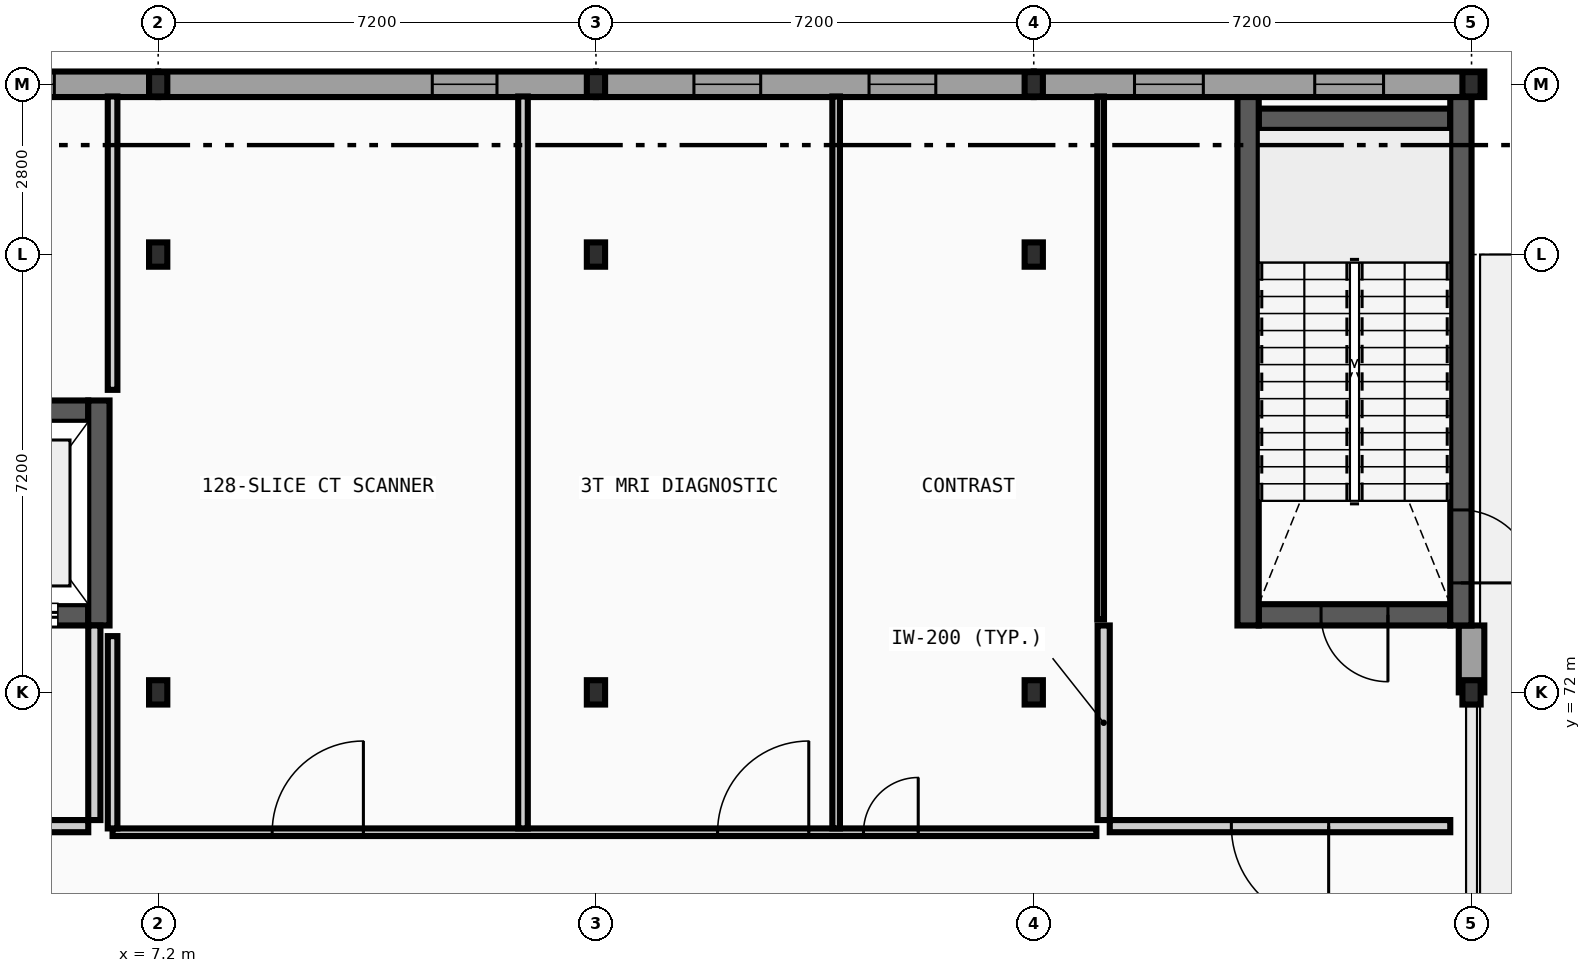
"""IFC4 building model, lengths in metres.
Left out: names, types, materials, properties, quantities, classifications, styles, units other than length and angle.
Written with IfcOpenShell. Run it as: python <this file> out.ifc"""

import sys

from ifc_helpers import new_model, si_unit, direction, frame, frame_2d, origin, origin_2d, place, context, subcontext, project, spatial, rectangle, i_section, extrude, element, fill, save


model = new_model("IFC4")
c1 = context("Model", 3, precision=1e-05, world=origin(), true_north=direction((0.0, 1.0)))
c2 = subcontext(c1, "Body", "Model", "MODEL_VIEW")
j1 = project(units=[si_unit("LENGTHUNIT", "METRE"), si_unit("PLANEANGLEUNIT", "RADIAN")], contexts=[c1])
p1 = place(None, origin())
s1 = spatial("IfcSite", under=j1, at=p1, CompositionType="ELEMENT")
p2 = place(p1, origin())
s2 = spatial("IfcBuilding", under=s1, at=p2, CompositionType="ELEMENT")
p3 = place(p2, origin())
s3 = spatial("IfcBuildingStorey", under=s2, at=p3, CompositionType="ELEMENT", Elevation=0.0)
for number, where, z_axis, x_axis in (
    (1, (7.2, 72.0, 0.0), (0.0, 0.0, 1.0), (1.0, 0.0, 0.0)),
    (2, (7.2, 79.2, 0.0), (0.0, 0.0, 1.0), (1.0, 0.0, 0.0)),
    (3, (7.2, 82.0, 0.0), (0.0, 0.0, 1.0), (1.0, 0.0, 0.0)),
    (4, (14.4, 72.0, 0.0), (0.0, 0.0, 1.0), (1.0, 0.0, 0.0)),
    (5, (14.4, 79.2, 0.0), (0.0, 0.0, 1.0), (1.0, 0.0, 0.0)),
    (6, (14.4, 82.0, 0.0), (0.0, 0.0, 1.0), (1.0, 0.0, 0.0)),
    (7, (21.6, 72.0, 0.0), (0.0, 0.0, 1.0), (1.0, 0.0, 0.0)),
    (8, (21.6, 79.2, 0.0), (0.0, 0.0, 1.0), (1.0, 0.0, 0.0)),
    (9, (21.6, 82.0, 0.0), (0.0, 0.0, 1.0), (1.0, 0.0, 0.0)),
    (10, (28.8, 72.0, 0.0), (0.0, 0.0, 1.0), (1.0, 0.0, 0.0)),
    (11, (28.8, 82.0, 0.0), (0.0, 0.0, 1.0), (1.0, 0.0, 0.0)),
):
    element("IfcColumn", number, at=place(p3, frame(where, z_axis=z_axis, x_axis=x_axis)), inside=s3, PredefinedType="COLUMN", context=c2, shape_type="SweptSolid", body=[
        extrude(i_section(OverallWidth=0.3, OverallDepth=0.4, WebThickness=0.013, FlangeThickness=0.024, FilletRadius=0.027, at=origin_2d()), origin(), (0.0, 0.0, 1.0), 5.2),
    ])
p4 = place(p3, frame((7.2, 82.0, 0.0), z_axis=(0.0, 0.0, 1.0), x_axis=(-1.0, 0.0, 0.0)))
e12 = element("IfcWall", 12, at=p4, inside=s3, PredefinedType="STANDARD", context=c2, shape_type="SweptSolid", body=[
    extrude(rectangle(XDim=7.41, YDim=0.42, at=frame_2d((3.705, 0.0))), origin(), (0.0, 0.0, 1.0), 4.635),
])
p5 = place(p4, frame((1.708, 0.0, 0.95)))
e13 = element("IfcOpeningElement", 13, at=p5, cuts=e12, PredefinedType="OPENING", context=c2, shape_type="SweptSolid", body=[
    extrude(rectangle(XDim=1.03, YDim=1.404, at=frame_2d((0.515, 0.702))), frame((0.0, 0.22, 0.0), z_axis=(0.0, -1.0, 0.0), x_axis=(1.0, 0.0, 0.0)), (0.0, 0.0, 1.0), 0.44),
])
p6 = place(p4, frame((4.672, 0.0, 0.95)))
e14 = element("IfcOpeningElement", 14, at=p6, cuts=e12, PredefinedType="OPENING", context=c2, shape_type="SweptSolid", body=[
    extrude(rectangle(XDim=1.03, YDim=1.404, at=frame_2d((0.515, 0.702))), frame((0.0, 0.22, 0.0), z_axis=(0.0, -1.0, 0.0), x_axis=(1.0, 0.0, 0.0)), (0.0, 0.0, 1.0), 0.44),
])
p7 = place(p3, frame((14.4, 82.0, 0.0), z_axis=(0.0, 0.0, 1.0), x_axis=(-1.0, 0.0, 0.0)))
e15 = element("IfcWall", 15, at=p7, inside=s3, PredefinedType="STANDARD", context=c2, shape_type="SweptSolid", body=[
    extrude(rectangle(XDim=7.2, YDim=0.42, at=frame_2d((3.6, 0.0))), origin(), (0.0, 0.0, 1.0), 4.635),
])
p8 = place(p7, frame((1.628, 0.0, 0.95)))
e16 = element("IfcOpeningElement", 16, at=p8, cuts=e15, PredefinedType="OPENING", context=c2, shape_type="SweptSolid", body=[
    extrude(rectangle(XDim=1.064, YDim=1.404, at=frame_2d((0.532, 0.702))), frame((0.0, 0.22, 0.0), z_axis=(0.0, -1.0, 0.0), x_axis=(1.0, 0.0, 0.0)), (0.0, 0.0, 1.0), 0.44),
])
p9 = place(p3, frame((21.6, 82.0, 0.0), z_axis=(0.0, 0.0, 1.0), x_axis=(-1.0, 0.0, 0.0)))
e17 = element("IfcWall", 17, at=p9, inside=s3, PredefinedType="STANDARD", context=c2, shape_type="SweptSolid", body=[
    extrude(rectangle(XDim=7.2, YDim=0.42, at=frame_2d((3.6, 0.0))), origin(), (0.0, 0.0, 1.0), 4.635),
])
p10 = place(p9, frame((1.611, 0.0, 0.95)))
e18 = element("IfcOpeningElement", 18, at=p10, cuts=e17, PredefinedType="OPENING", context=c2, shape_type="SweptSolid", body=[
    extrude(rectangle(XDim=1.098, YDim=1.404, at=frame_2d((0.549, 0.702))), frame((0.0, 0.22, 0.0), z_axis=(0.0, -1.0, 0.0), x_axis=(1.0, 0.0, 0.0)), (0.0, 0.0, 1.0), 0.44),
])
p11 = place(p9, frame((4.491, 0.0, 0.95)))
e19 = element("IfcOpeningElement", 19, at=p11, cuts=e17, PredefinedType="OPENING", context=c2, shape_type="SweptSolid", body=[
    extrude(rectangle(XDim=1.098, YDim=1.404, at=frame_2d((0.549, 0.702))), frame((0.0, 0.22, 0.0), z_axis=(0.0, -1.0, 0.0), x_axis=(1.0, 0.0, 0.0)), (0.0, 0.0, 1.0), 0.44),
])
p12 = place(p3, frame((29.01, 82.0, 0.0), z_axis=(0.0, 0.0, 1.0), x_axis=(-1.0, 0.0, 0.0)))
e20 = element("IfcWall", 20, at=p12, inside=s3, PredefinedType="STANDARD", context=c2, shape_type="SweptSolid", body=[
    extrude(rectangle(XDim=7.41, YDim=0.42, at=frame_2d((3.705, 0.0))), origin(), (0.0, 0.0, 1.0), 4.635),
])
p13 = place(p12, frame((1.657, 0.0, 0.95)))
e21 = element("IfcOpeningElement", 21, at=p13, cuts=e20, PredefinedType="OPENING", context=c2, shape_type="SweptSolid", body=[
    extrude(rectangle(XDim=1.132, YDim=1.404, at=frame_2d((0.566, 0.702))), frame((0.0, 0.22, 0.0), z_axis=(0.0, -1.0, 0.0), x_axis=(1.0, 0.0, 0.0)), (0.0, 0.0, 1.0), 0.44),
])
p14 = place(p12, frame((4.621, 0.0, 0.95)))
e22 = element("IfcOpeningElement", 22, at=p14, cuts=e20, PredefinedType="OPENING", context=c2, shape_type="SweptSolid", body=[
    extrude(rectangle(XDim=1.132, YDim=1.404, at=frame_2d((0.566, 0.702))), frame((0.0, 0.22, 0.0), z_axis=(0.0, -1.0, 0.0), x_axis=(1.0, 0.0, 0.0)), (0.0, 0.0, 1.0), 0.44),
])
p15 = place(p3, frame((28.8, 72.0, 0.0), z_axis=(0.0, 0.0, 1.0), x_axis=(0.0, 1.0, 0.0)))
e23 = element("IfcWall", 23, at=p15, inside=s3, PredefinedType="STANDARD", context=c2, shape_type="SweptSolid", body=[
    extrude(rectangle(XDim=1.1, YDim=0.42, at=frame_2d((0.55, 0.0))), origin(), (0.0, 0.0, 1.0), 4.94),
])
p16 = place(p3, frame((3.85, 73.275, 0.0), z_axis=(0.0, 0.0, 1.0), x_axis=(1.0, 0.0, 0.0)))
e24 = element("IfcWall", 24, at=p16, inside=s3, PredefinedType="SHEAR", context=c2, shape_type="SweptSolid", body=[
    extrude(rectangle(XDim=2.2, YDim=0.35, at=frame_2d((1.1, 0.0))), origin(), (0.0, 0.0, 1.0), 4.94),
])
p17 = place(p16, frame((0.5, 0.0, 0.0)))
e25 = element("IfcOpeningElement", 25, at=p17, cuts=e24, PredefinedType="OPENING", context=c2, shape_type="SweptSolid", body=[
    extrude(rectangle(XDim=1.2, YDim=2.2, at=frame_2d((0.6, 1.1))), frame((0.0, 0.185, 0.0), z_axis=(0.0, -1.0, 0.0), x_axis=(1.0, 0.0, 0.0)), (0.0, 0.0, 1.0), 0.37),
])
p18 = place(p3, frame((3.85, 76.625, 0.0), z_axis=(0.0, 0.0, 1.0), x_axis=(1.0, 0.0, 0.0)))
e26 = element("IfcWall", 26, at=p18, inside=s3, PredefinedType="SHEAR", context=c2, shape_type="SweptSolid", body=[
    extrude(rectangle(XDim=2.2, YDim=0.35, at=frame_2d((1.1, 0.0))), origin(), (0.0, 0.0, 1.0), 4.94),
])
p19 = place(p3, frame((6.225, 73.1, 0.0), z_axis=(0.0, 0.0, 1.0), x_axis=(0.0, 1.0, 0.0)))
e27 = element("IfcWall", 27, at=p19, inside=s3, PredefinedType="SHEAR", context=c2, shape_type="SweptSolid", body=[
    extrude(rectangle(XDim=3.7, YDim=0.35, at=frame_2d((1.85, 0.0))), origin(), (0.0, 0.0, 1.0), 4.94),
])
p20 = place(p3, frame((0.35, 69.8, 0.0), z_axis=(0.0, 0.0, 1.0), x_axis=(1.0, 0.0, 0.0)))
e28 = element("IfcWall", 28, at=p20, inside=s3, PredefinedType="PARTITIONING", context=c2, shape_type="SweptSolid", body=[
    extrude(rectangle(XDim=5.7, YDim=0.2, at=frame_2d((2.85, 0.0))), origin(), (0.0, 0.0, 1.0), 4.94),
])
p21 = place(p20, frame((2.05, 0.0, 0.0)))
e29 = element("IfcOpeningElement", 29, at=p21, cuts=e28, PredefinedType="OPENING", context=c2, shape_type="SweptSolid", body=[
    extrude(rectangle(XDim=1.6, YDim=2.2, at=frame_2d((0.8, 1.1))), frame((0.0, 0.11, 0.0), z_axis=(0.0, -1.0, 0.0), x_axis=(1.0, 0.0, 0.0)), (0.0, 0.0, 1.0), 0.22),
])
p22 = place(p3, frame((6.15, 69.9, 0.0), z_axis=(0.0, 0.0, 1.0), x_axis=(0.0, 1.0, 0.0)))
e30 = element("IfcWall", 30, at=p22, inside=s3, PredefinedType="PARTITIONING", context=c2, shape_type="SweptSolid", body=[
    extrude(rectangle(XDim=3.2, YDim=0.2, at=frame_2d((1.6, 0.0))), origin(), (0.0, 0.0, 1.0), 4.94),
])
p23 = place(p3, frame((25.3, 73.275, 0.0), z_axis=(0.0, 0.0, 1.0), x_axis=(1.0, 0.0, 0.0)))
e31 = element("IfcWall", 31, at=p23, inside=s3, PredefinedType="SHEAR", context=c2, shape_type="SweptSolid", body=[
    extrude(rectangle(XDim=3.15, YDim=0.35, at=frame_2d((1.575, 0.0))), origin(), (0.0, 0.0, 1.0), 4.94),
])
p24 = place(p23, frame((1.025, 0.0, 0.0)))
e32 = element("IfcOpeningElement", 32, at=p24, cuts=e31, PredefinedType="OPENING", context=c2, shape_type="SweptSolid", body=[
    extrude(rectangle(XDim=1.1, YDim=2.15, at=frame_2d((0.55, 1.075))), frame((0.0, 0.185, 0.0), z_axis=(0.0, -1.0, 0.0), x_axis=(1.0, 0.0, 0.0)), (0.0, 0.0, 1.0), 0.37),
])
p25 = place(p3, frame((25.3, 81.425, 0.0), z_axis=(0.0, 0.0, 1.0), x_axis=(1.0, 0.0, 0.0)))
e33 = element("IfcWall", 33, at=p25, inside=s3, PredefinedType="SHEAR", context=c2, shape_type="SweptSolid", body=[
    extrude(rectangle(XDim=3.15, YDim=0.35, at=frame_2d((1.575, 0.0))), origin(), (0.0, 0.0, 1.0), 4.94),
])
p26 = place(p3, frame((25.125, 73.1, 0.0), z_axis=(0.0, 0.0, 1.0), x_axis=(0.0, 1.0, 0.0)))
e34 = element("IfcWall", 34, at=p26, inside=s3, PredefinedType="SHEAR", context=c2, shape_type="SweptSolid", body=[
    extrude(rectangle(XDim=8.69, YDim=0.35, at=frame_2d((4.345, 0.0))), origin(), (0.0, 0.0, 1.0), 4.94),
])
p27 = place(p3, frame((28.625, 73.1, 0.0), z_axis=(0.0, 0.0, 1.0), x_axis=(0.0, 1.0, 0.0)))
e35 = element("IfcWall", 35, at=p27, inside=s3, PredefinedType="SHEAR", context=c2, shape_type="SweptSolid", body=[
    extrude(rectangle(XDim=8.69, YDim=0.35, at=frame_2d((4.345, 0.0))), origin(), (0.0, 0.0, 1.0), 4.94),
])
p28 = place(p27, frame((0.7, 0.0, 0.0)))
e36 = element("IfcOpeningElement", 36, at=p28, cuts=e35, PredefinedType="OPENING", context=c2, shape_type="SweptSolid", body=[
    extrude(rectangle(XDim=1.2, YDim=2.15, at=frame_2d((0.6, 1.075))), frame((0.0, 0.185, 0.0), z_axis=(0.0, -1.0, 0.0), x_axis=(1.0, 0.0, 0.0)), (0.0, 0.0, 1.0), 0.37),
])
p29 = place(p3, frame((22.85, 69.8, 0.0), z_axis=(0.0, 0.0, 1.0), x_axis=(1.0, 0.0, 0.0)))
e37 = element("IfcWall", 37, at=p29, inside=s3, PredefinedType="PARTITIONING", context=c2, shape_type="SweptSolid", body=[
    extrude(rectangle(XDim=5.6, YDim=0.2, at=frame_2d((2.8, 0.0))), origin(), (0.0, 0.0, 1.0), 4.94),
])
p30 = place(p29, frame((2.0, 0.0, 0.0)))
e38 = element("IfcOpeningElement", 38, at=p30, cuts=e37, PredefinedType="OPENING", context=c2, shape_type="SweptSolid", body=[
    extrude(rectangle(XDim=1.6, YDim=2.2, at=frame_2d((0.8, 1.1))), frame((0.0, 0.11, 0.0), z_axis=(0.0, -1.0, 0.0), x_axis=(1.0, 0.0, 0.0)), (0.0, 0.0, 1.0), 0.22),
])
p31 = place(p3, frame((22.75, 69.9, 0.0), z_axis=(0.0, 0.0, 1.0), x_axis=(0.0, 1.0, 0.0)))
e39 = element("IfcWall", 39, at=p31, inside=s3, PredefinedType="PARTITIONING", context=c2, shape_type="SweptSolid", body=[
    extrude(rectangle(XDim=3.2, YDim=0.2, at=frame_2d((1.6, 0.0))), origin(), (0.0, 0.0, 1.0), 4.94),
])
p32 = place(p3, frame((6.45, 69.7, 0.0), z_axis=(0.0, 0.0, 1.0), x_axis=(1.0, 0.0, 0.0)))
e40 = element("IfcWall", 40, at=p32, inside=s3, PredefinedType="PARTITIONING", context=c2, shape_type="SweptSolid", body=[
    extrude(rectangle(XDim=16.18, YDim=0.125, at=frame_2d((8.09, 0.0))), origin(), (0.0, 0.0, 1.0), 4.94),
])
p33 = place(p32, frame((12.35, 0.0, 0.0)))
e41 = element("IfcOpeningElement", 41, at=p33, cuts=e40, PredefinedType="OPENING", context=c2, shape_type="SweptSolid", body=[
    extrude(rectangle(XDim=0.9, YDim=2.1, at=frame_2d((0.45, 1.05))), frame((0.0, 0.073, 0.0), z_axis=(0.0, -1.0, 0.0), x_axis=(1.0, 0.0, 0.0)), (0.0, 0.0, 1.0), 0.145),
])
p34 = place(p32, frame((9.95, 0.0, 0.0)))
e42 = element("IfcOpeningElement", 42, at=p34, cuts=e40, PredefinedType="OPENING", context=c2, shape_type="SweptSolid", body=[
    extrude(rectangle(XDim=1.5, YDim=2.2, at=frame_2d((0.75, 1.1))), frame((0.0, 0.073, 0.0), z_axis=(0.0, -1.0, 0.0), x_axis=(1.0, 0.0, 0.0)), (0.0, 0.0, 1.0), 0.145),
])
p35 = place(p32, frame((2.625, 0.0, 0.0)))
e43 = element("IfcOpeningElement", 43, at=p35, cuts=e40, PredefinedType="OPENING", context=c2, shape_type="SweptSolid", body=[
    extrude(rectangle(XDim=1.5, YDim=2.2, at=frame_2d((0.75, 1.1))), frame((0.0, 0.073, 0.0), z_axis=(0.0, -1.0, 0.0), x_axis=(1.0, 0.0, 0.0)), (0.0, 0.0, 1.0), 0.145),
])
p36 = place(p3, frame((6.45, 69.762, 0.0), z_axis=(0.0, 0.0, 1.0), x_axis=(0.0, 1.0, 0.0)))
e44 = element("IfcWall", 44, at=p36, inside=s3, PredefinedType="PARTITIONING", context=c2, shape_type="SweptSolid", body=[
    extrude(rectangle(XDim=3.163, YDim=0.158, at=frame_2d((1.581, 0.0))), origin(), (0.0, 0.0, 1.0), 4.94),
])
p37 = place(p3, frame((6.45, 76.975, 0.0), z_axis=(0.0, 0.0, 1.0), x_axis=(0.0, 1.0, 0.0)))
e45 = element("IfcWall", 45, at=p37, inside=s3, PredefinedType="PARTITIONING", context=c2, shape_type="SweptSolid", body=[
    extrude(rectangle(XDim=4.825, YDim=0.158, at=frame_2d((2.413, 0.0))), origin(), (0.0, 0.0, 1.0), 4.94),
])
p38 = place(p3, frame((13.2, 69.762, 0.0), z_axis=(0.0, 0.0, 1.0), x_axis=(0.0, 1.0, 0.0)))
e46 = element("IfcWall", 46, at=p38, inside=s3, PredefinedType="PARTITIONING", context=c2, shape_type="SweptSolid", body=[
    extrude(rectangle(XDim=12.038, YDim=0.158, at=frame_2d((6.019, 0.0))), origin(), (0.0, 0.0, 1.0), 4.94),
])
p39 = place(p3, frame((18.35, 69.762, 0.0), z_axis=(0.0, 0.0, 1.0), x_axis=(0.0, 1.0, 0.0)))
e47 = element("IfcWall", 47, at=p39, inside=s3, PredefinedType="PARTITIONING", context=c2, shape_type="SweptSolid", body=[
    extrude(rectangle(XDim=12.038, YDim=0.125, at=frame_2d((6.019, 0.0))), origin(), (0.0, 0.0, 1.0), 4.94),
])
p40 = place(p3, frame((22.7, 73.2, 0.0), z_axis=(0.0, 0.0, 1.0), x_axis=(0.0, 1.0, 0.0)))
e48 = element("IfcWall", 48, at=p40, inside=s3, PredefinedType="PARTITIONING", context=c2, shape_type="SweptSolid", body=[
    extrude(rectangle(XDim=8.6, YDim=0.11, at=frame_2d((4.3, 0.0))), origin(), (0.0, 0.0, 1.0), 4.94),
])
p41 = place(p5, origin())
e49 = element("IfcWindow", 49, at=p41, inside=s3, PartitioningType="SINGLE_PANEL", PredefinedType="WINDOW", context=c2, shape_type="SweptSolid", body=[
    extrude(rectangle(XDim=1.03, YDim=1.404, at=frame_2d((0.515, 0.702))), frame((0.0, 0.03, 0.0), z_axis=(0.0, -1.0, 0.0), x_axis=(1.0, 0.0, 0.0)), (0.0, 0.0, 1.0), 0.06),
])
fill(e13, e49)
p42 = place(p8, origin())
e50 = element("IfcWindow", 50, at=p42, inside=s3, PartitioningType="SINGLE_PANEL", PredefinedType="WINDOW", context=c2, shape_type="SweptSolid", body=[
    extrude(rectangle(XDim=1.064, YDim=1.404, at=frame_2d((0.532, 0.702))), frame((0.0, 0.03, 0.0), z_axis=(0.0, -1.0, 0.0), x_axis=(1.0, 0.0, 0.0)), (0.0, 0.0, 1.0), 0.06),
])
fill(e16, e50)
p43 = place(p10, origin())
e51 = element("IfcWindow", 51, at=p43, inside=s3, PartitioningType="SINGLE_PANEL", PredefinedType="WINDOW", context=c2, shape_type="SweptSolid", body=[
    extrude(rectangle(XDim=1.098, YDim=1.404, at=frame_2d((0.549, 0.702))), frame((0.0, 0.03, 0.0), z_axis=(0.0, -1.0, 0.0), x_axis=(1.0, 0.0, 0.0)), (0.0, 0.0, 1.0), 0.06),
])
fill(e18, e51)
p44 = place(p11, origin())
e52 = element("IfcWindow", 52, at=p44, inside=s3, PartitioningType="SINGLE_PANEL", PredefinedType="WINDOW", context=c2, shape_type="SweptSolid", body=[
    extrude(rectangle(XDim=1.098, YDim=1.404, at=frame_2d((0.549, 0.702))), frame((0.0, 0.03, 0.0), z_axis=(0.0, -1.0, 0.0), x_axis=(1.0, 0.0, 0.0)), (0.0, 0.0, 1.0), 0.06),
])
fill(e19, e52)
p45 = place(p13, origin())
e53 = element("IfcWindow", 53, at=p45, inside=s3, PartitioningType="SINGLE_PANEL", PredefinedType="WINDOW", context=c2, shape_type="SweptSolid", body=[
    extrude(rectangle(XDim=1.132, YDim=1.404, at=frame_2d((0.566, 0.702))), frame((0.0, 0.03, 0.0), z_axis=(0.0, -1.0, 0.0), x_axis=(1.0, 0.0, 0.0)), (0.0, 0.0, 1.0), 0.06),
])
fill(e21, e53)
p46 = place(p14, origin())
e54 = element("IfcWindow", 54, at=p46, inside=s3, PartitioningType="SINGLE_PANEL", PredefinedType="WINDOW", context=c2, shape_type="SweptSolid", body=[
    extrude(rectangle(XDim=1.132, YDim=1.404, at=frame_2d((0.566, 0.702))), frame((0.0, 0.03, 0.0), z_axis=(0.0, -1.0, 0.0), x_axis=(1.0, 0.0, 0.0)), (0.0, 0.0, 1.0), 0.06),
])
fill(e22, e54)
p47 = place(p17, origin())
e55 = element("IfcDoor", 55, at=p47, inside=s3, OperationType="SLIDING_TO_RIGHT", PredefinedType="DOOR", context=c2, shape_type="SweptSolid", body=[
    extrude(rectangle(XDim=1.2, YDim=2.2, at=frame_2d((0.6, 1.1))), frame((0.0, 0.025, 0.0), z_axis=(0.0, -1.0, 0.0), x_axis=(1.0, 0.0, 0.0)), (0.0, 0.0, 1.0), 0.05),
])
fill(e25, e55)
p48 = place(p24, origin())
e56 = element("IfcDoor", 56, at=p48, inside=s3, OperationType="SINGLE_SWING_RIGHT", PredefinedType="DOOR", context=c2, shape_type="SweptSolid", body=[
    extrude(rectangle(XDim=1.1, YDim=2.15, at=frame_2d((0.55, 1.075))), frame((0.0, 0.025, 0.0), z_axis=(0.0, -1.0, 0.0), x_axis=(1.0, 0.0, 0.0)), (0.0, 0.0, 1.0), 0.05),
])
fill(e32, e56)
p49 = place(p28, frame((1.2, 0.0, 0.0), z_axis=(0.0, 0.0, 1.0), x_axis=(-1.0, 0.0, 0.0)))
e57 = element("IfcDoor", 57, at=p49, inside=s3, OperationType="SINGLE_SWING_LEFT", PredefinedType="DOOR", context=c2, shape_type="SweptSolid", body=[
    extrude(rectangle(XDim=1.2, YDim=2.15, at=frame_2d((0.6, 1.075))), frame((0.0, 0.025, 0.0), z_axis=(0.0, -1.0, 0.0), x_axis=(1.0, 0.0, 0.0)), (0.0, 0.0, 1.0), 0.05),
])
fill(e36, e57)
p50 = place(p30, origin())
e58 = element("IfcDoor", 58, at=p50, inside=s3, OperationType="DOUBLE_DOOR_SINGLE_SWING", PredefinedType="DOOR", context=c2, shape_type="SweptSolid", body=[
    extrude(rectangle(XDim=1.6, YDim=2.2, at=frame_2d((0.8, 1.1))), frame((0.0, 0.025, 0.0), z_axis=(0.0, -1.0, 0.0), x_axis=(1.0, 0.0, 0.0)), (0.0, 0.0, 1.0), 0.05),
])
fill(e38, e58)
p51 = place(p33, frame((0.9, 0.0, 0.0), z_axis=(0.0, 0.0, 1.0), x_axis=(-1.0, 0.0, 0.0)))
e59 = element("IfcDoor", 59, at=p51, inside=s3, OperationType="SINGLE_SWING_RIGHT", PredefinedType="DOOR", context=c2, shape_type="SweptSolid", body=[
    extrude(rectangle(XDim=0.9, YDim=2.1, at=frame_2d((0.45, 1.05))), frame((0.0, 0.025, 0.0), z_axis=(0.0, -1.0, 0.0), x_axis=(1.0, 0.0, 0.0)), (0.0, 0.0, 1.0), 0.05),
])
fill(e41, e59)
p52 = place(p34, frame((1.5, 0.0, 0.0), z_axis=(0.0, 0.0, 1.0), x_axis=(-1.0, 0.0, 0.0)))
e60 = element("IfcDoor", 60, at=p52, inside=s3, OperationType="DOUBLE_DOOR_SINGLE_SWING", PredefinedType="DOOR", context=c2, shape_type="SweptSolid", body=[
    extrude(rectangle(XDim=1.5, YDim=2.2, at=frame_2d((0.75, 1.1))), frame((0.0, 0.025, 0.0), z_axis=(0.0, -1.0, 0.0), x_axis=(1.0, 0.0, 0.0)), (0.0, 0.0, 1.0), 0.05),
])
fill(e42, e60)
p53 = place(p35, frame((1.5, 0.0, 0.0), z_axis=(0.0, 0.0, 1.0), x_axis=(-1.0, 0.0, 0.0)))
e61 = element("IfcDoor", 61, at=p53, inside=s3, OperationType="DOUBLE_DOOR_SINGLE_SWING", PredefinedType="DOOR", context=c2, shape_type="SweptSolid", body=[
    extrude(rectangle(XDim=1.5, YDim=2.2, at=frame_2d((0.75, 1.1))), frame((0.0, 0.025, 0.0), z_axis=(0.0, -1.0, 0.0), x_axis=(1.0, 0.0, 0.0)), (0.0, 0.0, 1.0), 0.05),
])
fill(e43, e61)
save(model, sys.argv[1])
